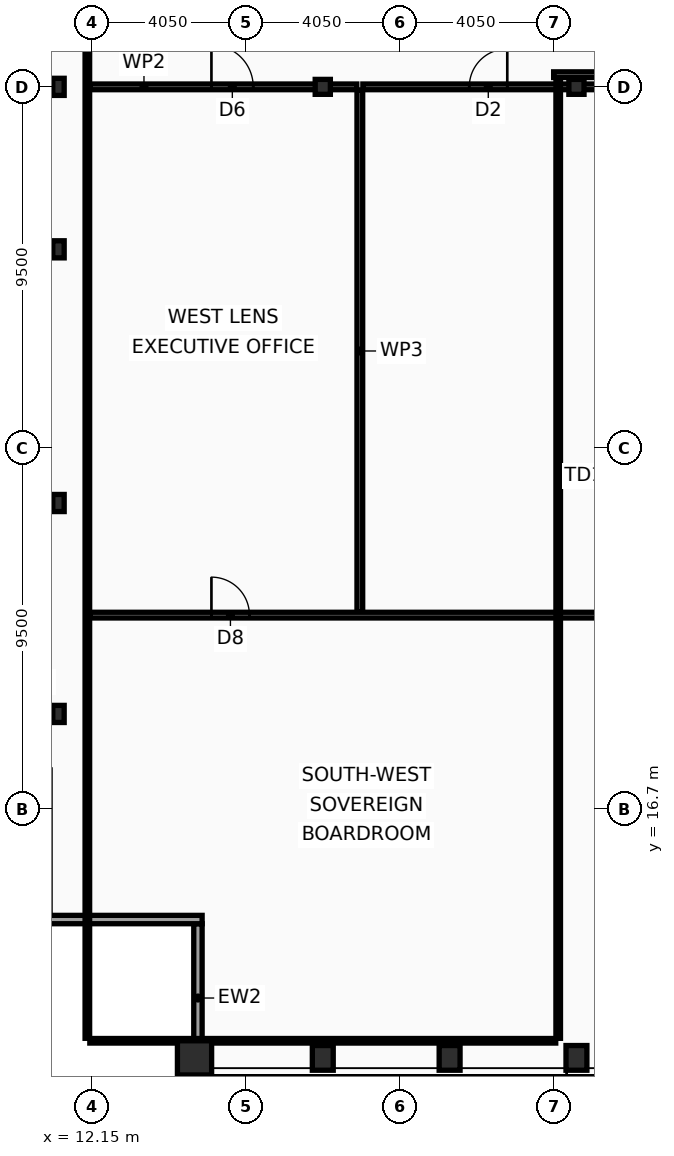
"""IFC4 building model, lengths in metres.
Left out: names, types, materials, properties, quantities, classifications, styles, units other than length and angle.
Written with IfcOpenShell. Run it as: python <this file> out.ifc"""

import sys

from ifc_helpers import new_model, si_unit, direction, frame, frame_2d, origin, origin_2d, place, context, subcontext, project, spatial, rectangle, hollow_rectangle, i_section, extrude, element, fill, save


model = new_model("IFC4")
c1 = context("Model", 3, precision=1e-05, world=origin(), true_north=direction((0.0, 1.0)))
c2 = subcontext(c1, "Body", "Model", "MODEL_VIEW")
j1 = project(units=[si_unit("LENGTHUNIT", "METRE"), si_unit("PLANEANGLEUNIT", "RADIAN")], contexts=[c1])
p1 = place(None, origin())
s1 = spatial("IfcSite", under=j1, at=p1, CompositionType="ELEMENT")
p2 = place(p1, origin())
s2 = spatial("IfcBuilding", under=s1, at=p2, CompositionType="ELEMENT")
p3 = place(p2, frame((0.0, 0.0, 305.8)))
s3 = spatial("IfcBuildingStorey", under=s2, at=p3, CompositionType="ELEMENT", Elevation=305.8)
p4 = place(p3, frame((14.85, 10.15, 0.0), z_axis=(0.0, 0.0, 1.0), x_axis=(1.0, 0.0, 0.0)))
e1 = element("IfcColumn", 1, at=p4, inside=s3, PredefinedType="COLUMN", context=c2, shape_type="SweptSolid", body=[
    extrude(hollow_rectangle(XDim=0.9, YDim=0.9, WallThickness=0.05, at=origin_2d()), origin(), (0.0, 0.0, 1.0), 4.4),
])
for number, where, z_axis, x_axis in (
    (2, (18.225, 10.15, 0.0), (0.0, 0.0, 1.0), (1.0, 0.0, 0.0)),
    (3, (21.562, 10.15, 0.0), (0.0, 0.0, 1.0), (1.0, 0.0, 0.0)),
    (4, (24.9, 10.15, 0.0), (0.0, 0.0, 1.0), (1.0, 0.0, 0.0)),
):
    element("IfcColumn", number, at=place(p3, frame(where, z_axis=z_axis, x_axis=x_axis)), inside=s3, PredefinedType="COLUMN", context=c2, shape_type="SweptSolid", body=[
        extrude(hollow_rectangle(XDim=0.55, YDim=0.65, WallThickness=0.04, at=origin_2d()), origin(), (0.0, 0.0, 1.0), 4.4),
    ])
for number, where, z_axis, x_axis in (
    (5, (11.27, 19.2, 0.0), (0.0, 0.0, 1.0), (1.0, 0.0, 0.0)),
    (6, (11.27, 24.75, 0.0), (0.0, 0.0, 1.0), (1.0, 0.0, 0.0)),
    (7, (11.27, 31.425, 0.0), (0.0, 0.0, 1.0), (1.0, 0.0, 0.0)),
    (8, (11.27, 35.7, 0.0), (0.0, 0.0, 1.0), (1.0, 0.0, 0.0)),
):
    element("IfcColumn", number, at=place(p3, frame(where, z_axis=z_axis, x_axis=x_axis)), inside=s3, PredefinedType="COLUMN", context=c2, shape_type="SweptSolid", body=[
        extrude(i_section(OverallWidth=0.3, OverallDepth=0.45, WebThickness=0.014, FlangeThickness=0.026, at=origin_2d()), origin(), (0.0, 0.0, 1.0), 4.4),
    ])
for number, where, z_axis, x_axis in (
    (9, (18.225, 35.7, 0.0), (0.0, 0.0, 1.0), (1.0, 0.0, 0.0)),
    (10, (24.9, 35.7, 0.0), (0.0, 0.0, 1.0), (1.0, 0.0, 0.0)),
):
    element("IfcColumn", number, at=place(p3, frame(where, z_axis=z_axis, x_axis=x_axis)), inside=s3, PredefinedType="COLUMN", context=c2, shape_type="SweptSolid", body=[
        extrude(i_section(OverallWidth=0.399, OverallDepth=0.393, WebThickness=0.023, FlangeThickness=0.037, at=origin_2d()), origin(), (0.0, 0.0, 1.0), 4.4),
    ])
p5 = place(p3, frame((14.94, 9.77, 0.0), z_axis=(0.0, 0.0, 1.0), x_axis=(0.0, 1.0, 0.0)))
e11 = element("IfcWall", 11, at=p5, inside=s3, PredefinedType="SOLIDWALL", context=c2, shape_type="SweptSolid", body=[
    extrude(rectangle(XDim=3.91, YDim=0.22, at=frame_2d((1.955, 0.0))), origin(), (0.0, 0.0, 1.0), 3.68),
])
p6 = place(p3, frame((15.05, 13.79, 0.0), z_axis=(0.0, 0.0, 1.0), x_axis=(-1.0, 0.0, 0.0)))
e12 = element("IfcWall", 12, at=p6, inside=s3, PredefinedType="SOLIDWALL", context=c2, shape_type="SweptSolid", body=[
    extrude(rectangle(XDim=4.22, YDim=0.22, at=frame_2d((2.11, 0.0))), origin(), (0.0, 0.0, 1.0), 3.68),
])
p7 = place(p3, frame((12.095, 35.7, 0.0), z_axis=(0.0, 0.0, 1.0), x_axis=(1.0, 0.0, 0.0)))
e13 = element("IfcWall", 13, at=p7, inside=s3, PredefinedType="PARTITIONING", context=c2, shape_type="SweptSolid", body=[
    extrude(rectangle(XDim=7.025, YDim=0.15, at=frame_2d((3.513, 0.0))), origin(), (0.0, 0.0, 1.0), 3.58),
])
p8 = place(p7, frame((3.2, 0.0, 0.0)))
e14 = element("IfcOpeningElement", 14, at=p8, cuts=e13, PredefinedType="OPENING", context=c2, shape_type="SweptSolid", body=[
    extrude(rectangle(XDim=1.1, YDim=2.1, at=frame_2d((0.55, 1.05))), frame((0.0, 0.085, 0.0), z_axis=(0.0, -1.0, 0.0), x_axis=(1.0, 0.0, 0.0)), (0.0, 0.0, 1.0), 0.17),
])
p9 = place(p3, frame((19.28, 35.7, 0.0), z_axis=(0.0, 0.0, 1.0), x_axis=(1.0, 0.0, 0.0)))
e15 = element("IfcWall", 15, at=p9, inside=s3, PredefinedType="PARTITIONING", context=c2, shape_type="SweptSolid", body=[
    extrude(rectangle(XDim=6.92, YDim=0.15, at=frame_2d((3.46, 0.0))), origin(), (0.0, 0.0, 1.0), 3.58),
])
p10 = place(p9, frame((2.8, 0.0, 0.0)))
e16 = element("IfcOpeningElement", 16, at=p10, cuts=e15, PredefinedType="OPENING", context=c2, shape_type="SweptSolid", body=[
    extrude(rectangle(XDim=1.0, YDim=2.05, at=frame_2d((0.5, 1.025))), frame((0.0, 0.085, 0.0), z_axis=(0.0, -1.0, 0.0), x_axis=(1.0, 0.0, 0.0)), (0.0, 0.0, 1.0), 0.17),
])
p11 = place(p3, frame((19.2, 21.88, 0.0), z_axis=(0.0, 0.0, 1.0), x_axis=(0.0, 1.0, 0.0)))
e17 = element("IfcWall", 17, at=p11, inside=s3, PredefinedType="PARTITIONING", context=c2, shape_type="SweptSolid", body=[
    extrude(rectangle(XDim=13.74, YDim=0.15, at=frame_2d((6.87, 0.0))), origin(), (0.0, 0.0, 1.0), 3.83),
])
p12 = place(p3, frame((12.095, 21.8, 0.0), z_axis=(0.0, 0.0, 1.0), x_axis=(1.0, 0.0, 0.0)))
e18 = element("IfcWall", 18, at=p12, inside=s3, PredefinedType="PARTITIONING", context=c2, shape_type="SweptSolid", body=[
    extrude(rectangle(XDim=14.105, YDim=0.15, at=frame_2d((7.052, 0.0))), origin(), (0.0, 0.0, 1.0), 3.58),
])
p13 = place(p12, frame((3.2, 0.0, 0.0)))
e19 = element("IfcOpeningElement", 19, at=p13, cuts=e18, PredefinedType="OPENING", context=c2, shape_type="SweptSolid", body=[
    extrude(rectangle(XDim=1.0, YDim=2.05, at=frame_2d((0.5, 1.025))), frame((0.0, 0.085, 0.0), z_axis=(0.0, -1.0, 0.0), x_axis=(1.0, 0.0, 0.0)), (0.0, 0.0, 1.0), 0.17),
])
p14 = place(p3, frame((24.3, 36.02, 0.0), z_axis=(0.0, 0.0, 1.0), x_axis=(1.0, 0.0, 0.0)))
e20 = element("IfcWall", 20, at=p14, inside=s3, PredefinedType="PARTITIONING", context=c2, shape_type="SweptSolid", body=[
    extrude(rectangle(XDim=24.3, YDim=0.15, at=frame_2d((12.15, 0.0))), origin(), (0.0, 0.0, 1.0), 3.58),
])
p15 = place(p3, frame((12.03, 10.665, 0.0), z_axis=(0.0, 0.0, 1.0), x_axis=(0.0, 1.0, 0.0)))
e21 = element("IfcWall", 21, at=p15, inside=s3, PredefinedType="PARTITIONING", context=c2, shape_type="SweptSolid", body=[
    extrude(rectangle(XDim=42.11, YDim=0.12, at=frame_2d((21.055, 0.0))), origin(), (0.0, 0.0, 1.0), 3.58),
])
p16 = place(p3, frame((12.095, 10.6, 0.0), z_axis=(0.0, 0.0, 1.0), x_axis=(1.0, 0.0, 0.0)))
e22 = element("IfcWall", 22, at=p16, inside=s3, PredefinedType="PARTITIONING", context=c2, shape_type="SweptSolid", body=[
    extrude(rectangle(XDim=12.26, YDim=0.12, at=frame_2d((6.13, 0.0))), origin(), (0.0, 0.0, 1.0), 3.58),
])
p17 = place(p3, frame((24.42, 10.665, 0.0), z_axis=(0.0, 0.0, 1.0), x_axis=(0.0, 1.0, 0.0)))
e23 = element("IfcWall", 23, at=p17, inside=s3, PredefinedType="PARTITIONING", context=c2, shape_type="SweptSolid", body=[
    extrude(rectangle(XDim=25.275, YDim=0.12, at=frame_2d((12.637, 0.0))), origin(), (0.0, 0.0, 1.0), 3.58),
])
p18 = place(p8, origin())
e24 = element("IfcDoor", 24, at=p18, inside=s3, OperationType="SINGLE_SWING_LEFT", PredefinedType="DOOR", context=c2, shape_type="SweptSolid", body=[
    extrude(rectangle(XDim=1.1, YDim=2.1, at=frame_2d((0.55, 1.05))), frame((0.0, 0.025, 0.0), z_axis=(0.0, -1.0, 0.0), x_axis=(1.0, 0.0, 0.0)), (0.0, 0.0, 1.0), 0.05),
])
fill(e14, e24)
p19 = place(p10, origin())
e25 = element("IfcDoor", 25, at=p19, inside=s3, OperationType="SINGLE_SWING_RIGHT", PredefinedType="DOOR", context=c2, shape_type="SweptSolid", body=[
    extrude(rectangle(XDim=1.0, YDim=2.05, at=frame_2d((0.5, 1.025))), frame((0.0, 0.025, 0.0), z_axis=(0.0, -1.0, 0.0), x_axis=(1.0, 0.0, 0.0)), (0.0, 0.0, 1.0), 0.05),
])
fill(e16, e25)
p20 = place(p13, origin())
e26 = element("IfcDoor", 26, at=p20, inside=s3, OperationType="SINGLE_SWING_LEFT", PredefinedType="DOOR", context=c2, shape_type="SweptSolid", body=[
    extrude(rectangle(XDim=1.0, YDim=2.05, at=frame_2d((0.5, 1.025))), frame((0.0, 0.025, 0.0), z_axis=(0.0, -1.0, 0.0), x_axis=(1.0, 0.0, 0.0)), (0.0, 0.0, 1.0), 0.05),
])
fill(e19, e26)
save(model, sys.argv[1])
